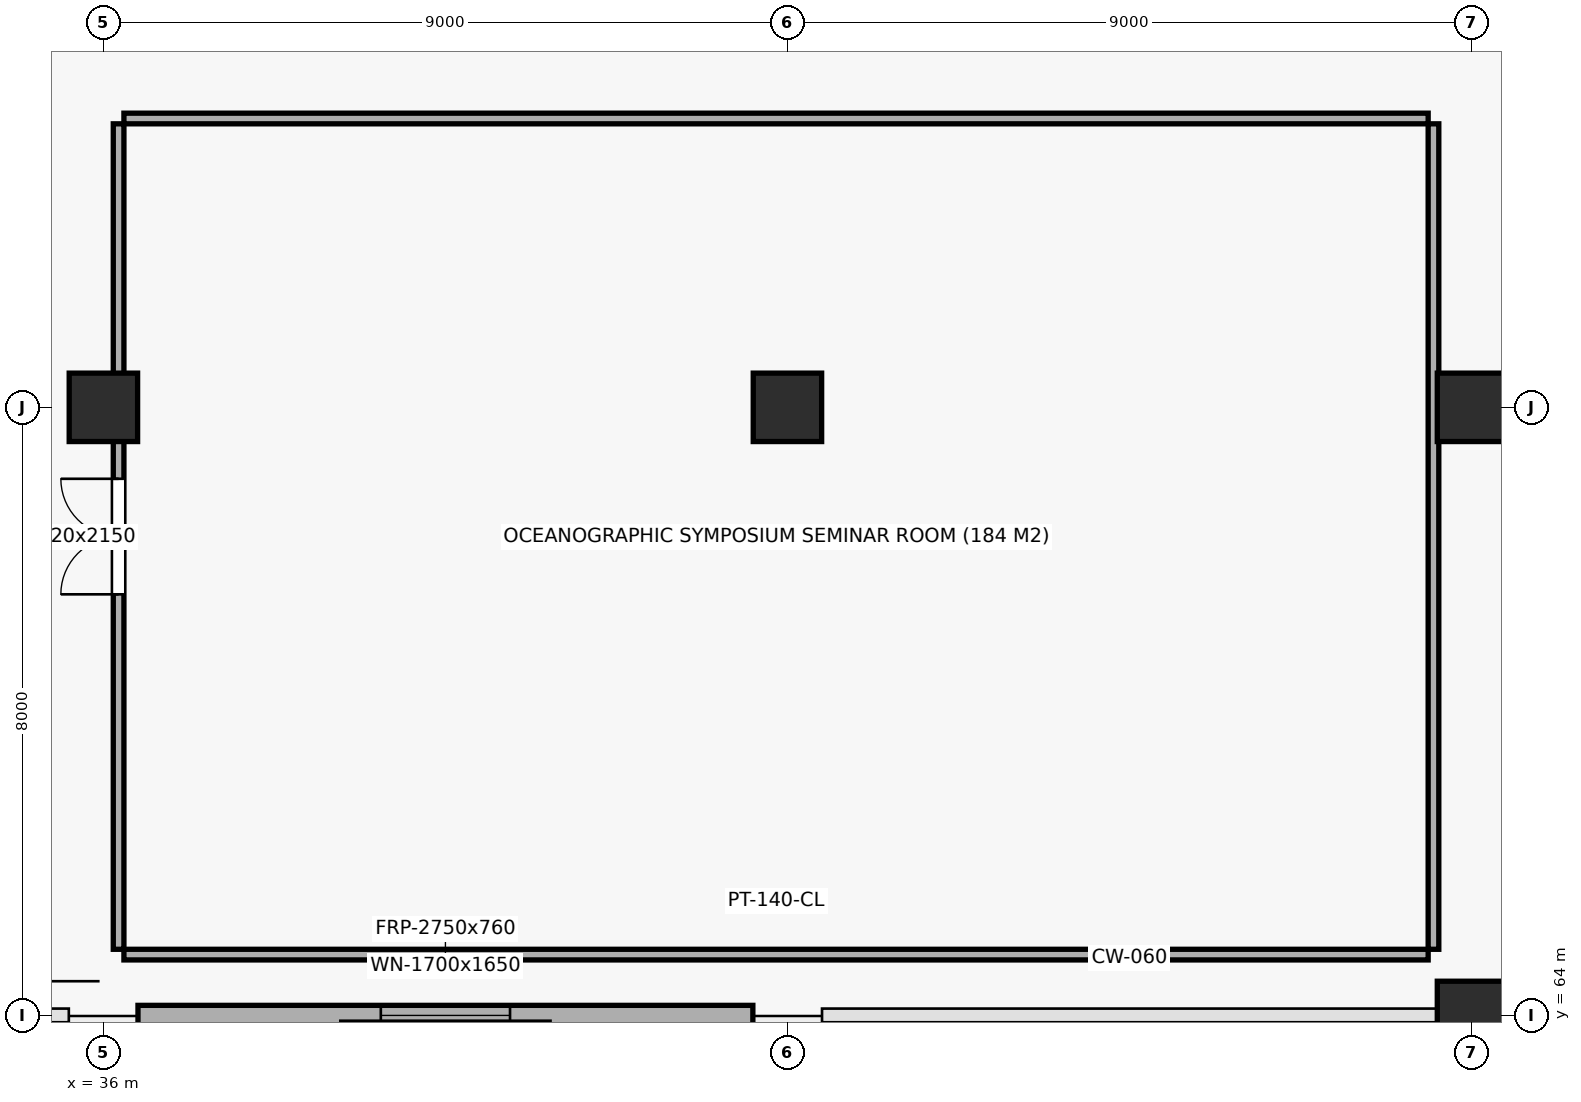
"""IFC4 building model, lengths in metres.
Left out: names, types, materials, properties, quantities, classifications, styles, units other than length and angle.
Written with IfcOpenShell. Run it as: python <this file> out.ifc"""

import sys

from ifc_helpers import new_model, si_unit, direction, frame, frame_2d, origin, origin_2d, place, context, subcontext, project, spatial, rectangle, extrude, element, fill, save


model = new_model("IFC4")
c1 = context("Model", 3, precision=1e-05, world=origin(), true_north=direction((0.0, 1.0)))
c2 = subcontext(c1, "Body", "Model", "MODEL_VIEW")
j1 = project(units=[si_unit("LENGTHUNIT", "METRE"), si_unit("PLANEANGLEUNIT", "RADIAN")], contexts=[c1])
p1 = place(None, origin())
s1 = spatial("IfcSite", under=j1, at=p1, CompositionType="ELEMENT")
p2 = place(p1, origin())
s2 = spatial("IfcBuilding", under=s1, at=p2, CompositionType="ELEMENT")
p3 = place(p2, frame((0.0, 0.0, 18.0)))
s3 = spatial("IfcBuildingStorey", under=s2, at=p3, CompositionType="ELEMENT", Elevation=18.0)
for number, where, z_axis, x_axis in (
    (1, (36.0, 72.0, 0.0), (0.0, 0.0, 1.0), (1.0, 0.0, 0.0)),
    (2, (45.0, 72.0, 0.0), (0.0, 0.0, 1.0), (1.0, 0.0, 0.0)),
    (3, (54.0, 64.0, 0.0), (0.0, 0.0, 1.0), (1.0, 0.0, 0.0)),
    (4, (54.0, 72.0, 0.0), (0.0, 0.0, 1.0), (1.0, 0.0, 0.0)),
):
    element("IfcColumn", number, at=place(p3, frame(where, z_axis=z_axis, x_axis=x_axis)), inside=s3, PredefinedType="COLUMN", context=c2, shape_type="SweptSolid", body=[
        extrude(rectangle(XDim=0.9, YDim=0.9, at=origin_2d()), origin(), (0.0, 0.0, 1.0), 3.9),
    ])
p4 = place(p3, frame((36.455, 64.0, 0.0), z_axis=(0.0, 0.0, 1.0), x_axis=(1.0, 0.0, 0.0)))
e5 = element("IfcWall", 5, at=p4, inside=s3, PredefinedType="STANDARD", context=c2, shape_type="SweptSolid", body=[
    extrude(rectangle(XDim=8.09, YDim=0.265, at=frame_2d((4.045, 0.0))), origin(), (0.0, 0.0, 1.0), 2.98),
])
p5 = place(p4, frame((3.195, 0.0, 0.85)))
e6 = element("IfcOpeningElement", 6, at=p5, cuts=e5, PredefinedType="OPENING", context=c2, shape_type="SweptSolid", body=[
    extrude(rectangle(XDim=1.7, YDim=1.65, at=frame_2d((0.85, 0.825))), frame((0.0, 0.145, 0.0), z_axis=(0.0, -1.0, 0.0), x_axis=(1.0, 0.0, 0.0)), (0.0, 0.0, 1.0), 0.289),
])
for number, where, z_axis, x_axis in (
    (7, (36.27, 64.8, 0.0), (0.0, 0.0, 1.0), (1.0, 0.0, 0.0)),
    (8, (36.27, 75.8, 0.0), (0.0, 0.0, 1.0), (1.0, 0.0, 0.0)),
):
    element("IfcWall", number, at=place(p3, frame(where, z_axis=z_axis, x_axis=x_axis)), inside=s3, PredefinedType="PARTITIONING", context=c2, shape_type="SweptSolid", body=[
        extrude(rectangle(XDim=17.16, YDim=0.14, at=frame_2d((8.58, 0.0))), origin(), (0.0, 0.0, 1.0), 3.65),
    ])
p6 = place(p3, frame((36.2, 64.87, 0.0), z_axis=(0.0, 0.0, 1.0), x_axis=(0.0, 1.0, 0.0)))
e9 = element("IfcWall", 9, at=p6, inside=s3, PredefinedType="PARTITIONING", context=c2, shape_type="SweptSolid", body=[
    extrude(rectangle(XDim=10.86, YDim=0.14, at=frame_2d((5.43, 0.0))), origin(), (0.0, 0.0, 1.0), 2.85),
])
p7 = place(p6, frame((4.67, 0.0, 0.0)))
e10 = element("IfcOpeningElement", 10, at=p7, cuts=e9, PredefinedType="OPENING", context=c2, shape_type="SweptSolid", body=[
    extrude(rectangle(XDim=1.52, YDim=2.15, at=frame_2d((0.76, 1.075))), frame((0.0, 0.082, 0.0), z_axis=(0.0, -1.0, 0.0), x_axis=(1.0, 0.0, 0.0)), (0.0, 0.0, 1.0), 0.164),
])
p8 = place(p3, frame((53.5, 64.87, 0.0), z_axis=(0.0, 0.0, 1.0), x_axis=(0.0, 1.0, 0.0)))
e11 = element("IfcWall", 11, at=p8, inside=s3, PredefinedType="PARTITIONING", context=c2, shape_type="SweptSolid", body=[
    extrude(rectangle(XDim=10.86, YDim=0.14, at=frame_2d((5.43, 0.0))), origin(), (0.0, 0.0, 1.0), 3.65),
])
p9 = place(p5, origin())
e12 = element("IfcWindow", 12, at=p9, inside=s3, PartitioningType="SINGLE_PANEL", PredefinedType="WINDOW", context=c2, shape_type="SweptSolid", body=[
    extrude(rectangle(XDim=1.7, YDim=1.65, at=frame_2d((0.85, 0.825))), frame((0.0, 0.03, 0.0), z_axis=(0.0, -1.0, 0.0), x_axis=(1.0, 0.0, 0.0)), (0.0, 0.0, 1.0), 0.06),
])
fill(e6, e12)
p10 = place(p7, origin())
e13 = element("IfcDoor", 13, at=p10, inside=s3, OperationType="DOUBLE_DOOR_SINGLE_SWING", PredefinedType="DOOR", context=c2, shape_type="SweptSolid", body=[
    extrude(rectangle(XDim=1.52, YDim=2.15, at=frame_2d((0.76, 1.075))), frame((0.0, 0.025, 0.0), z_axis=(0.0, -1.0, 0.0), x_axis=(1.0, 0.0, 0.0)), (0.0, 0.0, 1.0), 0.05),
])
fill(e10, e13)
save(model, sys.argv[1])
